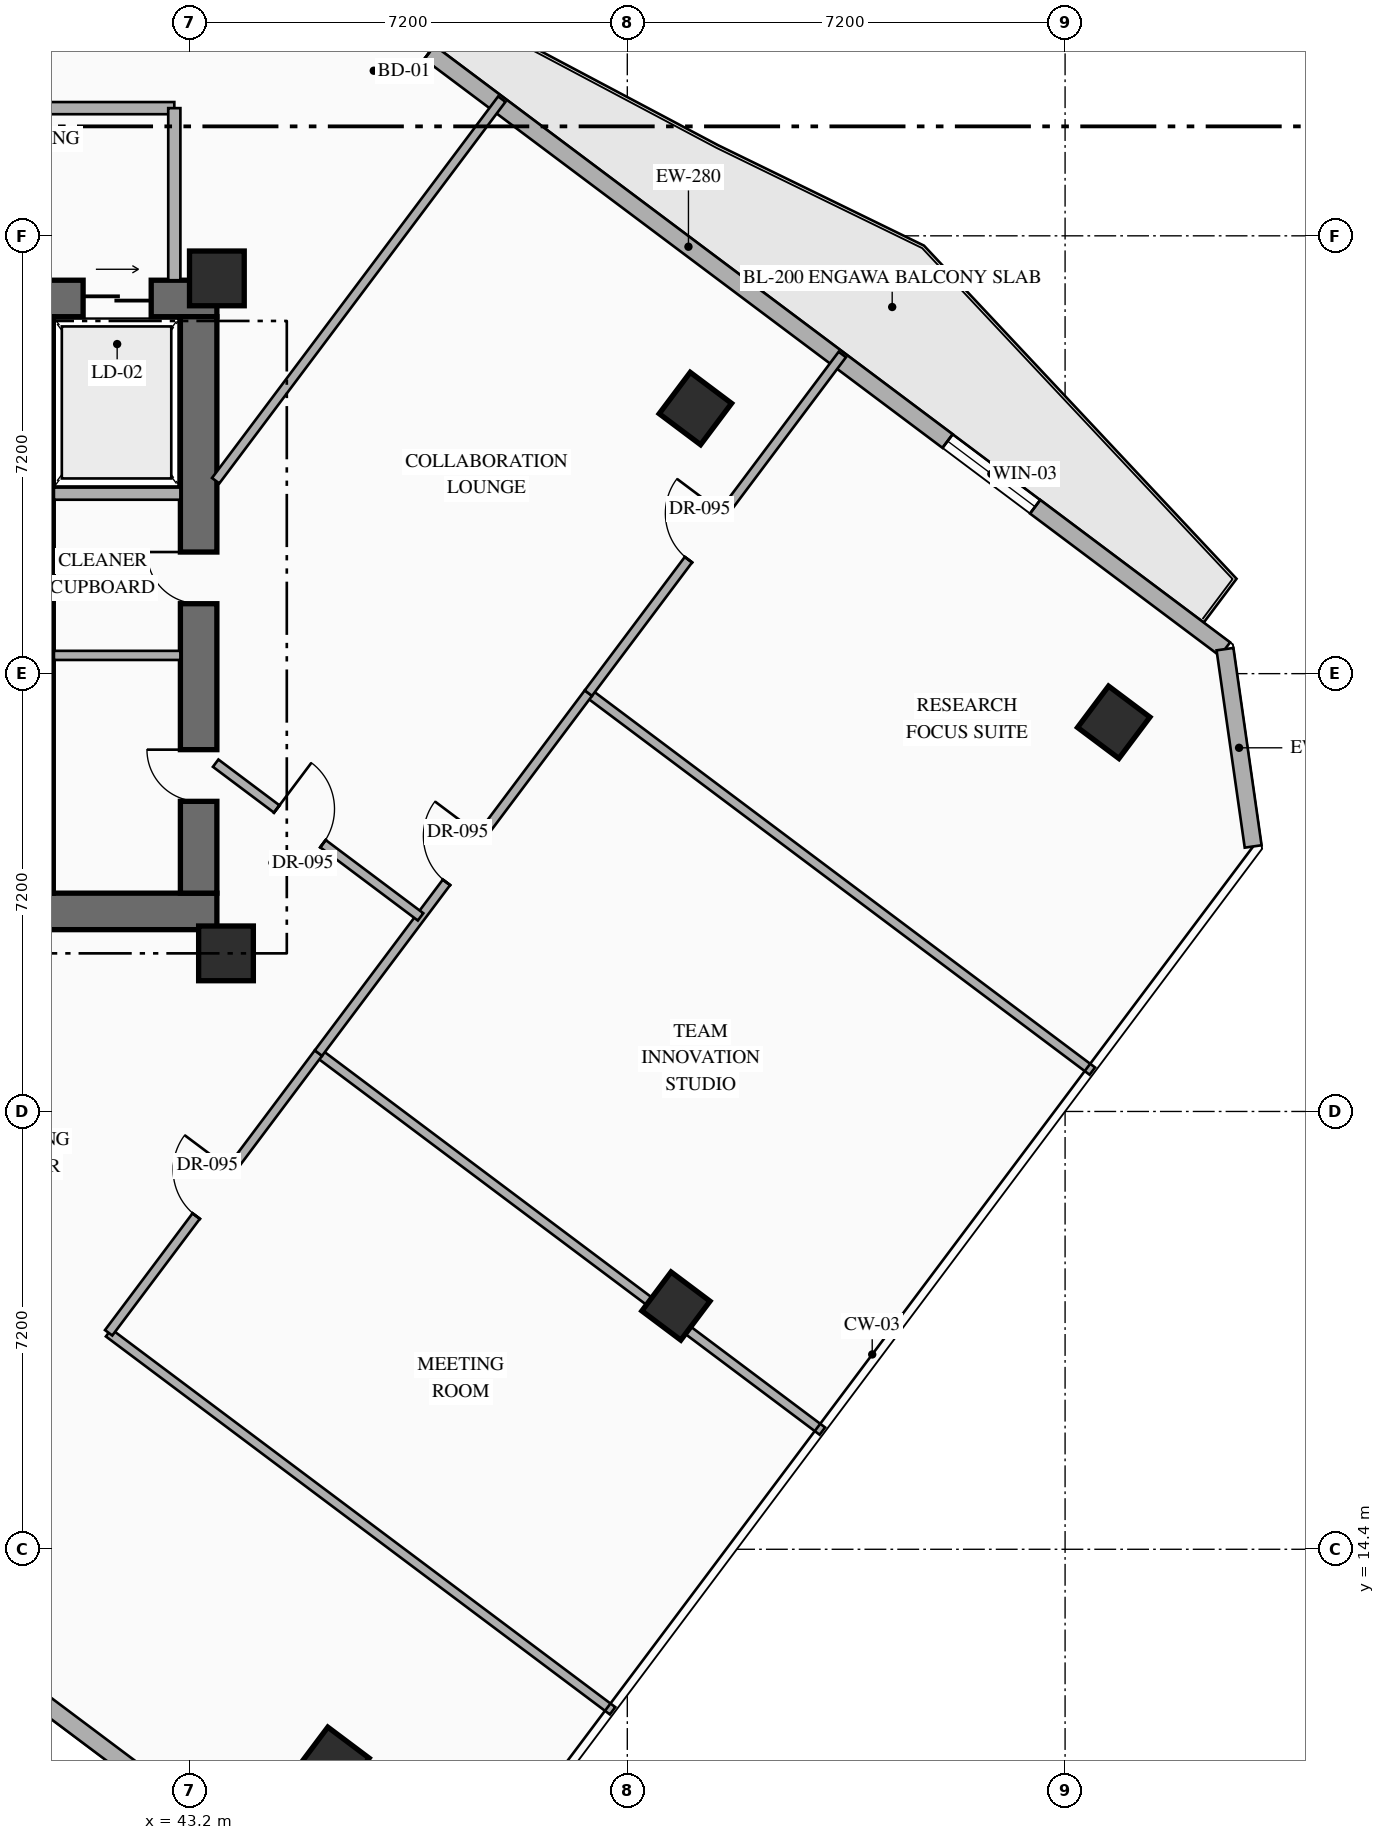
"""IFC4 building model, lengths in metres.
Left out: names, types, materials, properties, quantities, classifications, styles, units other than length and angle.
Written with IfcOpenShell. Run it as: python <this file> out.ifc"""

import sys

from ifc_helpers import new_model, si_unit, direction, frame, frame_2d, origin, origin_2d, place, context, subcontext, project, spatial, rectangle, hollow_rectangle, extrude, element, fill, save


model = new_model("IFC4")
c1 = context("Model", 3, precision=1e-05, world=origin(), true_north=direction((0.0, 1.0)))
c2 = subcontext(c1, "Body", "Model", "MODEL_VIEW")
j1 = project(units=[si_unit("LENGTHUNIT", "METRE"), si_unit("PLANEANGLEUNIT", "RADIAN")], contexts=[c1])
p1 = place(None, origin())
s1 = spatial("IfcSite", under=j1, at=p1, CompositionType="ELEMENT")
p2 = place(p1, origin())
s2 = spatial("IfcBuilding", under=s1, at=p2, CompositionType="ELEMENT")
p3 = place(p2, frame((0.0, 0.0, 142.05)))
s3 = spatial("IfcBuildingStorey", under=s2, at=p3, CompositionType="ELEMENT", Elevation=142.05)
p4 = place(p3, frame((35.89, 24.89, 0.0), z_axis=(0.0, 0.0, 1.0), x_axis=(1.0, 0.0, 0.0)))
e1 = element("IfcWall", 1, at=p4, inside=s3, PredefinedType="SHEAR", context=c2, shape_type="SweptSolid", body=[
    extrude(rectangle(XDim=7.76, YDim=0.6, at=frame_2d((3.88, 0.0))), origin(), (0.0, 0.0, 1.0), 3.6),
])
p5 = place(p3, frame((35.89, 34.97, 0.0), z_axis=(0.0, 0.0, 1.0), x_axis=(1.0, 0.0, 0.0)))
e2 = element("IfcWall", 2, at=p5, inside=s3, PredefinedType="SHEAR", context=c2, shape_type="SweptSolid", body=[
    extrude(rectangle(XDim=7.76, YDim=0.6, at=frame_2d((3.88, 0.0))), origin(), (0.0, 0.0, 1.0), 3.6),
])
p6 = place(p5, frame((2.66, 0.0, 0.0)))
e3 = element("IfcOpeningElement", 3, at=p6, cuts=e2, PredefinedType="OPENING", context=c2, shape_type="SweptSolid", body=[
    extrude(rectangle(XDim=1.1, YDim=2.2, at=frame_2d((0.55, 1.1))), frame((0.0, 0.31, 0.0), z_axis=(0.0, -1.0, 0.0), x_axis=(1.0, 0.0, 0.0)), (0.0, 0.0, 1.0), 0.62),
])
p7 = place(p5, frame((5.56, 0.0, 0.0)))
e4 = element("IfcOpeningElement", 4, at=p7, cuts=e2, PredefinedType="OPENING", context=c2, shape_type="SweptSolid", body=[
    extrude(rectangle(XDim=1.12, YDim=2.15, at=frame_2d((0.56, 1.075))), frame((0.0, 0.31, 0.0), z_axis=(0.0, -1.0, 0.0), x_axis=(1.0, 0.0, 0.0)), (0.0, 0.0, 1.0), 0.62),
])
p8 = place(p3, frame((43.35, 25.19, 0.0), z_axis=(0.0, 0.0, 1.0), x_axis=(0.0, 1.0, 0.0)))
e5 = element("IfcWall", 5, at=p8, inside=s3, PredefinedType="SHEAR", context=c2, shape_type="SweptSolid", body=[
    extrude(rectangle(XDim=9.48, YDim=0.6, at=frame_2d((4.74, 0.0))), origin(), (0.0, 0.0, 1.0), 3.6),
])
p9 = place(p8, frame((1.51, 0.0, 0.0)))
e6 = element("IfcOpeningElement", 6, at=p9, cuts=e5, PredefinedType="OPENING", context=c2, shape_type="SweptSolid", body=[
    extrude(rectangle(XDim=0.85, YDim=2.08, at=frame_2d((0.425, 1.04))), frame((0.0, 0.31, 0.0), z_axis=(0.0, -1.0, 0.0), x_axis=(1.0, 0.0, 0.0)), (0.0, 0.0, 1.0), 0.62),
])
p10 = place(p8, frame((4.76, 0.0, 0.0)))
e7 = element("IfcOpeningElement", 7, at=p10, cuts=e5, PredefinedType="OPENING", context=c2, shape_type="SweptSolid", body=[
    extrude(rectangle(XDim=0.85, YDim=2.08, at=frame_2d((0.425, 1.04))), frame((0.0, 0.31, 0.0), z_axis=(0.0, -1.0, 0.0), x_axis=(1.0, 0.0, 0.0)), (0.0, 0.0, 1.0), 0.62),
])
p11 = place(p3, frame((40.81, 25.19, 0.0), z_axis=(0.0, 0.0, 1.0), x_axis=(0.0, 1.0, 0.0)))
e8 = element("IfcWall", 8, at=p11, inside=s3, PredefinedType="SHEAR", context=c2, shape_type="SweptSolid", body=[
    extrude(rectangle(XDim=9.48, YDim=0.3, at=frame_2d((4.74, 0.0))), origin(), (0.0, 0.0, 1.0), 3.6),
])
for number, where, z_axis, x_axis in (
    (9, (43.8, 24.2, 0.0), (0.0, 0.0, 1.0), (1.0, 0.0, 0.0)),
    (10, (43.65, 35.3, 0.0), (0.0, 0.0, 1.0), (1.0, 0.0, 0.0)),
):
    element("IfcColumn", number, at=place(p3, frame(where, z_axis=z_axis, x_axis=x_axis)), inside=s3, PredefinedType="COLUMN", context=c2, shape_type="SweptSolid", body=[
        extrude(rectangle(XDim=0.9, YDim=0.9, at=origin_2d()), origin(), (0.0, 0.0, 1.0), 3.6),
    ])
for number, where, z_axis, x_axis in (
    (11, (51.52, 33.16, 0.0), (0.0, 0.0, 1.0), (0.8, -0.6, 0.0)),
    (12, (45.56, 10.88, 0.0), (0.0, 0.0, 1.0), (0.8, -0.6, 0.0)),
    (13, (58.4, 28.0, 0.0), (0.0, 0.0, 1.0), (0.8, -0.6, 0.0)),
):
    element("IfcColumn", number, at=place(p3, frame(where, z_axis=z_axis, x_axis=x_axis)), inside=s3, PredefinedType="COLUMN", context=c2, shape_type="SweptSolid", body=[
        extrude(hollow_rectangle(XDim=0.85, YDim=0.85, WallThickness=0.032, at=origin_2d()), origin(), (0.0, 0.0, 1.0), 3.6),
    ])
p12 = place(p3, frame((51.2, 18.4, 0.0), z_axis=(0.0, 0.0, 1.0), x_axis=(0.799999996291, -0.600000004945, 0.0)))
e14 = element("IfcColumn", 14, at=p12, inside=s3, PredefinedType="COLUMN", context=c2, shape_type="SweptSolid", body=[
    extrude(hollow_rectangle(XDim=0.8, YDim=0.8, WallThickness=0.032, at=origin_2d()), origin(), (0.0, 0.0, 1.0), 3.6),
])
p13 = place(p3, frame((44.86, 40.73, 0.0), z_axis=(0.0, 0.0, 1.0), x_axis=(0.800007624502, -0.599989833863, 0.0)))
e15 = element("IfcWall", 15, at=p13, inside=s3, PredefinedType="STANDARD", context=c2, shape_type="SweptSolid", body=[
    extrude(rectangle(XDim=19.212, YDim=0.28, at=frame_2d((9.606, 0.0))), origin(), (0.0, 0.0, 1.0), 3.35),
])
p14 = place(p13, frame((1.755, 0.0, 0.0)))
e16 = element("IfcOpeningElement", 16, at=p14, cuts=e15, PredefinedType="OPENING", context=c2, shape_type="SweptSolid", body=[
    extrude(rectangle(XDim=1.1, YDim=2.2, at=frame_2d((0.55, 1.1))), frame((0.0, 0.15, 0.0), z_axis=(0.0, -1.0, 0.0), x_axis=(1.0, 0.0, 0.0)), (0.0, 0.0, 1.0), 0.3),
])
p15 = place(p13, frame((13.509, 0.0, 0.85)))
e17 = element("IfcOpeningElement", 17, at=p15, cuts=e15, PredefinedType="OPENING", context=c2, shape_type="SweptSolid", body=[
    extrude(rectangle(XDim=1.8, YDim=2.1, at=frame_2d((0.9, 1.05))), frame((0.0, 0.15, 0.0), z_axis=(0.0, -1.0, 0.0), x_axis=(1.0, 0.0, 0.0)), (0.0, 0.0, 1.0), 0.3),
])
p16 = place(p3, frame((60.23, 29.203, 0.0), z_axis=(0.0, 0.0, 1.0), x_axis=(0.141296221922, -0.989967361922, 0.0)))
e18 = element("IfcWall", 18, at=p16, inside=s3, PredefinedType="STANDARD", context=c2, shape_type="SweptSolid", body=[
    extrude(rectangle(XDim=3.278, YDim=0.28, at=frame_2d((1.639, 0.0))), origin(), (0.0, 0.0, 1.0), 3.35),
])
p17 = place(p3, frame((44.918, 8.787, 0.0), z_axis=(0.0, 0.0, 1.0), x_axis=(-0.800004765927, 0.599993645378, 0.0)))
e19 = element("IfcWall", 19, at=p17, inside=s3, PredefinedType="STANDARD", context=c2, shape_type="SweptSolid", body=[
    extrude(rectangle(XDim=24.588, YDim=0.28, at=frame_2d((12.294, 0.0))), origin(), (0.0, 0.0, 1.0), 3.35),
])
p18 = place(p3, frame((40.97, 31.76, 0.0), z_axis=(0.0, 0.0, 1.0), x_axis=(1.0, 0.0, 0.0)))
e20 = element("IfcWall", 20, at=p18, inside=s3, PredefinedType="STANDARD", context=c2, shape_type="SweptSolid", body=[
    extrude(rectangle(XDim=2.08, YDim=0.2, at=frame_2d((1.04, 0.0))), origin(), (0.0, 0.0, 1.0), 3.35),
])
p19 = place(p3, frame((40.97, 29.1, 0.0), z_axis=(0.0, 0.0, 1.0), x_axis=(1.0, 0.0, 0.0)))
e21 = element("IfcWall", 21, at=p19, inside=s3, PredefinedType="PARTITIONING", context=c2, shape_type="SweptSolid", body=[
    extrude(rectangle(XDim=2.08, YDim=0.15, at=frame_2d((1.04, 0.0))), origin(), (0.0, 0.0, 1.0), 3.35),
])
p20 = place(p3, frame((37.65, 38.1, 0.0), z_axis=(0.0, 0.0, 1.0), x_axis=(1.0, 0.0, 0.0)))
e22 = element("IfcWall", 22, at=p20, inside=s3, PredefinedType="STANDARD", context=c2, shape_type="SweptSolid", body=[
    extrude(rectangle(XDim=5.3, YDim=0.2, at=frame_2d((2.65, 0.0))), origin(), (0.0, 0.0, 1.0), 3.35),
])
p21 = place(p3, frame((42.95, 35.27, 0.0), z_axis=(0.0, 0.0, 1.0), x_axis=(0.0, 1.0, 0.0)))
e23 = element("IfcWall", 23, at=p21, inside=s3, PredefinedType="STANDARD", context=c2, shape_type="SweptSolid", body=[
    extrude(rectangle(XDim=2.83, YDim=0.2, at=frame_2d((1.415, 0.0))), origin(), (0.0, 0.0, 1.0), 3.35),
])
p22 = place(p3, frame((41.87, 17.96, 0.0), z_axis=(0.0, 0.0, 1.0), x_axis=(0.799991516197, -0.600011311571, 0.0)))
e24 = element("IfcWall", 24, at=p22, inside=s3, PredefinedType="PARTITIONING", context=c2, shape_type="SweptSolid", body=[
    extrude(rectangle(XDim=10.36, YDim=0.15, at=frame_2d((5.18, 0.0))), origin(), (0.0, 0.0, 1.0), 3.35),
])
p23 = place(p3, frame((45.32, 22.56, 0.0), z_axis=(0.0, 0.0, 1.0), x_axis=(0.799991516197, -0.600011311571, 0.0)))
e25 = element("IfcWall", 25, at=p23, inside=s3, PredefinedType="PARTITIONING", context=c2, shape_type="SweptSolid", body=[
    extrude(rectangle(XDim=10.36, YDim=0.15, at=frame_2d((5.18, 0.0))), origin(), (0.0, 0.0, 1.0), 2.695),
])
p24 = place(p3, frame((41.87, 17.96, 0.0), z_axis=(0.0, 0.0, 1.0), x_axis=(0.599986413072, 0.800010190015, 0.0)))
e26 = element("IfcWall", 26, at=p24, inside=s3, PredefinedType="PARTITIONING", context=c2, shape_type="SweptSolid", body=[
    extrude(rectangle(XDim=5.75, YDim=0.15, at=frame_2d((2.875, 0.0))), origin(), (0.0, 0.0, 1.0), 3.35),
])
p25 = place(p24, frame((2.4, 0.0, 0.0)))
e27 = element("IfcOpeningElement", 27, at=p25, cuts=e26, PredefinedType="OPENING", context=c2, shape_type="SweptSolid", body=[
    extrude(rectangle(XDim=0.95, YDim=2.15, at=frame_2d((0.475, 1.075))), frame((0.0, 0.085, 0.0), z_axis=(0.0, -1.0, 0.0), x_axis=(1.0, 0.0, 0.0)), (0.0, 0.0, 1.0), 0.17),
])
p26 = place(p3, frame((49.76, 28.48, 0.0), z_axis=(0.0, 0.0, 1.0), x_axis=(0.8, -0.6, 0.0)))
e28 = element("IfcWall", 28, at=p26, inside=s3, PredefinedType="PARTITIONING", context=c2, shape_type="SweptSolid", body=[
    extrude(rectangle(XDim=10.36, YDim=0.15, at=frame_2d((5.18, 0.0))), origin(), (0.0, 0.0, 1.0), 3.35),
])
p27 = place(p3, frame((45.32, 22.56, 0.0), z_axis=(0.0, 0.0, 1.0), x_axis=(0.6, 0.8, 0.0)))
e29 = element("IfcWall", 29, at=p27, inside=s3, PredefinedType="PARTITIONING", context=c2, shape_type="SweptSolid", body=[
    extrude(rectangle(XDim=7.4, YDim=0.15, at=frame_2d((3.7, 0.0))), origin(), (0.0, 0.0, 1.0), 3.35),
])
p28 = place(p27, frame((3.51, 0.0, 0.0)))
e30 = element("IfcOpeningElement", 30, at=p28, cuts=e29, PredefinedType="OPENING", context=c2, shape_type="SweptSolid", body=[
    extrude(rectangle(XDim=0.95, YDim=2.15, at=frame_2d((0.475, 1.075))), frame((0.0, 0.085, 0.0), z_axis=(0.0, -1.0, 0.0), x_axis=(1.0, 0.0, 0.0)), (0.0, 0.0, 1.0), 0.17),
])
p29 = place(p3, frame((49.76, 28.48, 0.0), z_axis=(0.0, 0.0, 1.0), x_axis=(0.599994387644, 0.800004209236, 0.0)))
e31 = element("IfcWall", 31, at=p29, inside=s3, PredefinedType="PARTITIONING", context=c2, shape_type="SweptSolid", body=[
    extrude(rectangle(XDim=6.96, YDim=0.15, at=frame_2d((3.48, 0.0))), origin(), (0.0, 0.0, 1.0), 3.35),
])
p30 = place(p29, frame((2.743, 0.0, 0.0)))
e32 = element("IfcOpeningElement", 32, at=p30, cuts=e31, PredefinedType="OPENING", context=c2, shape_type="SweptSolid", body=[
    extrude(rectangle(XDim=0.95, YDim=2.15, at=frame_2d((0.475, 1.075))), frame((0.0, 0.085, 0.0), z_axis=(0.0, -1.0, 0.0), x_axis=(1.0, 0.0, 0.0)), (0.0, 0.0, 1.0), 0.17),
])
p31 = place(p3, frame((43.63, 27.328, 0.0), z_axis=(0.0, 0.0, 1.0), x_axis=(0.799972182084, -0.600037088764, 0.0)))
e33 = element("IfcWall", 33, at=p31, inside=s3, PredefinedType="PARTITIONING", context=c2, shape_type="SweptSolid", body=[
    extrude(rectangle(XDim=4.213, YDim=0.15, at=frame_2d((2.106, 0.0))), origin(), (0.0, 0.0, 1.0), 3.045),
])
p32 = place(p31, frame((1.256, 0.0, 0.0)))
e34 = element("IfcOpeningElement", 34, at=p32, cuts=e33, PredefinedType="OPENING", context=c2, shape_type="SweptSolid", body=[
    extrude(rectangle(XDim=0.95, YDim=2.15, at=frame_2d((0.475, 1.075))), frame((0.0, 0.085, 0.0), z_axis=(0.0, -1.0, 0.0), x_axis=(1.0, 0.0, 0.0)), (0.0, 0.0, 1.0), 0.17),
])
p33 = place(p3, frame((43.63, 31.973, 0.0), z_axis=(0.0, 0.0, 1.0), x_axis=(0.599975099311, 0.800018674911, 0.0)))
e35 = element("IfcWall", 35, at=p33, inside=s3, PredefinedType="PARTITIONING", context=c2, shape_type="SweptSolid", body=[
    extrude(rectangle(XDim=7.844, YDim=0.15, at=frame_2d((3.922, 0.0))), origin(), (0.0, 0.0, 1.0), 3.35),
])
p34 = place(p14, origin())
e36 = element("IfcDoor", 36, at=p34, inside=s3, OperationType="SINGLE_SWING_LEFT", PredefinedType="DOOR", context=c2, shape_type="SweptSolid", body=[
    extrude(rectangle(XDim=1.1, YDim=2.2, at=frame_2d((0.55, 1.1))), frame((0.0, 0.025, 0.0), z_axis=(0.0, -1.0, 0.0), x_axis=(1.0, 0.0, 0.0)), (0.0, 0.0, 1.0), 0.05),
])
fill(e16, e36)
p35 = place(p15, origin())
e37 = element("IfcWindow", 37, at=p35, inside=s3, PartitioningType="SINGLE_PANEL", PredefinedType="WINDOW", context=c2, shape_type="SweptSolid", body=[
    extrude(rectangle(XDim=1.8, YDim=2.1, at=frame_2d((0.9, 1.05))), frame((0.0, 0.03, 0.0), z_axis=(0.0, -1.0, 0.0), x_axis=(1.0, 0.0, 0.0)), (0.0, 0.0, 1.0), 0.06),
])
fill(e17, e37)
p36 = place(p7, origin())
e38 = element("IfcDoor", 38, at=p36, inside=s3, OperationType="SLIDING_TO_RIGHT", PredefinedType="USERDEFINED", context=c2, shape_type="SweptSolid", body=[
    extrude(rectangle(XDim=1.12, YDim=2.15, at=frame_2d((0.56, 1.075))), frame((0.0, 0.025, 0.0), z_axis=(0.0, -1.0, 0.0), x_axis=(1.0, 0.0, 0.0)), (0.0, 0.0, 1.0), 0.05),
])
fill(e4, e38)
p37 = place(p9, origin())
e39 = element("IfcDoor", 39, at=p37, inside=s3, OperationType="SINGLE_SWING_RIGHT", PredefinedType="DOOR", context=c2, shape_type="SweptSolid", body=[
    extrude(rectangle(XDim=0.85, YDim=2.08, at=frame_2d((0.425, 1.04))), frame((0.0, 0.025, 0.0), z_axis=(0.0, -1.0, 0.0), x_axis=(1.0, 0.0, 0.0)), (0.0, 0.0, 1.0), 0.05),
])
fill(e6, e39)
p38 = place(p10, origin())
e40 = element("IfcDoor", 40, at=p38, inside=s3, OperationType="SINGLE_SWING_RIGHT", PredefinedType="DOOR", context=c2, shape_type="SweptSolid", body=[
    extrude(rectangle(XDim=0.85, YDim=2.08, at=frame_2d((0.425, 1.04))), frame((0.0, 0.025, 0.0), z_axis=(0.0, -1.0, 0.0), x_axis=(1.0, 0.0, 0.0)), (0.0, 0.0, 1.0), 0.05),
])
fill(e7, e40)
p39 = place(p25, origin())
e41 = element("IfcDoor", 41, at=p39, inside=s3, OperationType="SINGLE_SWING_RIGHT", PredefinedType="DOOR", context=c2, shape_type="SweptSolid", body=[
    extrude(rectangle(XDim=0.95, YDim=2.15, at=frame_2d((0.475, 1.075))), frame((0.0, 0.025, 0.0), z_axis=(0.0, -1.0, 0.0), x_axis=(1.0, 0.0, 0.0)), (0.0, 0.0, 1.0), 0.05),
])
fill(e27, e41)
p40 = place(p28, origin())
e42 = element("IfcDoor", 42, at=p40, inside=s3, OperationType="SINGLE_SWING_RIGHT", PredefinedType="DOOR", context=c2, shape_type="SweptSolid", body=[
    extrude(rectangle(XDim=0.95, YDim=2.15, at=frame_2d((0.475, 1.075))), frame((0.0, 0.025, 0.0), z_axis=(0.0, -1.0, 0.0), x_axis=(1.0, 0.0, 0.0)), (0.0, 0.0, 1.0), 0.05),
])
fill(e30, e42)
p41 = place(p30, origin())
e43 = element("IfcDoor", 43, at=p41, inside=s3, OperationType="SINGLE_SWING_RIGHT", PredefinedType="DOOR", context=c2, shape_type="SweptSolid", body=[
    extrude(rectangle(XDim=0.95, YDim=2.15, at=frame_2d((0.475, 1.075))), frame((0.0, 0.025, 0.0), z_axis=(0.0, -1.0, 0.0), x_axis=(1.0, 0.0, 0.0)), (0.0, 0.0, 1.0), 0.05),
])
fill(e32, e43)
p42 = place(p32, origin())
e44 = element("IfcDoor", 44, at=p42, inside=s3, OperationType="SINGLE_SWING_LEFT", PredefinedType="DOOR", context=c2, shape_type="SweptSolid", body=[
    extrude(rectangle(XDim=0.95, YDim=2.15, at=frame_2d((0.475, 1.075))), frame((0.0, 0.025, 0.0), z_axis=(0.0, -1.0, 0.0), x_axis=(1.0, 0.0, 0.0)), (0.0, 0.0, 1.0), 0.05),
])
fill(e34, e44)
save(model, sys.argv[1])
